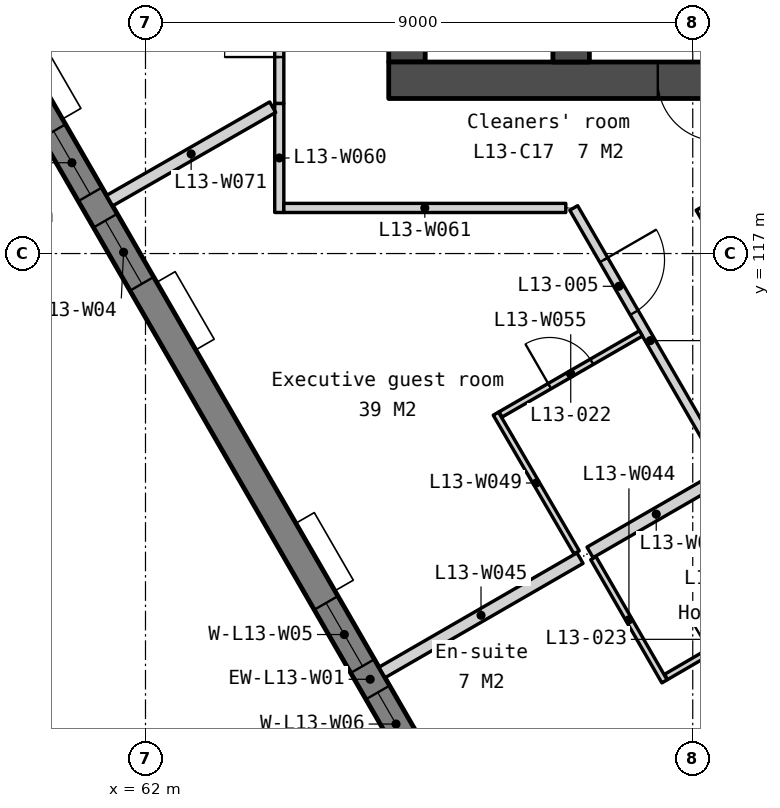
"""IFC4 building model, lengths in metres.
Left out: names, types, materials, properties, quantities, classifications, styles, units other than length and angle.
Written with IfcOpenShell. Run it as: python <this file> out.ifc"""

import sys

from ifc_helpers import new_model, si_unit, direction, frame, frame_2d, origin, place, context, subcontext, project, spatial, polyline, rectangle, outline, extrude, element, fill, save


model = new_model("IFC4")
c1 = context("Model", 3, precision=1e-05, world=origin(), true_north=direction((0.0, 1.0)))
c2 = subcontext(c1, "Body", "Model", "MODEL_VIEW")
j1 = project(units=[si_unit("LENGTHUNIT", "METRE"), si_unit("PLANEANGLEUNIT", "RADIAN")], contexts=[c1])
p1 = place(None, origin())
s1 = spatial("IfcSite", under=j1, at=p1, CompositionType="ELEMENT")
p2 = place(p1, origin())
s2 = spatial("IfcBuilding", under=s1, at=p2, CompositionType="ELEMENT")
p3 = place(p2, frame((0.0, 0.0, 59.5)))
s3 = spatial("IfcBuildingStorey", under=s2, at=p3, CompositionType="ELEMENT", Elevation=59.5)
p4 = place(p3, frame((66.3, 133.95, 0.0), z_axis=(0.0, 0.0, 1.0), x_axis=(0.0, -1.0, 0.0)))
e1 = element("IfcWall", 1, at=p4, inside=s3, PredefinedType="SOLIDWALL", context=c2, shape_type="SweptSolid", body=[
    extrude(rectangle(XDim=13.8, YDim=0.6, at=frame_2d((6.9, 0.0))), origin(), (0.0, 0.0, 1.0), 3.35),
])
p5 = place(p4, frame((0.6, 0.0, 0.0)))
e2 = element("IfcOpeningElement", 2, at=p5, cuts=e1, PredefinedType="OPENING", context=c2, shape_type="SweptSolid", body=[
    extrude(rectangle(XDim=1.1, YDim=2.1, at=frame_2d((0.55, 1.05))), frame((0.0, 0.31, 0.0), z_axis=(0.0, -1.0, 0.0), x_axis=(1.0, 0.0, 0.0)), (0.0, 0.0, 1.0), 0.62),
])
p6 = place(p4, frame((12.4, 0.0, 0.0)))
e3 = element("IfcOpeningElement", 3, at=p6, cuts=e1, PredefinedType="OPENING", context=c2, shape_type="SweptSolid", body=[
    extrude(rectangle(XDim=1.0, YDim=2.1, at=frame_2d((0.5, 1.05))), frame((0.0, 0.31, 0.0), z_axis=(0.0, -1.0, 0.0), x_axis=(1.0, 0.0, 0.0)), (0.0, 0.0, 1.0), 0.62),
])
p7 = place(p4, frame((8.5, 0.0, 0.0)))
e4 = element("IfcOpeningElement", 4, at=p7, cuts=e1, PredefinedType="OPENING", context=c2, shape_type="SweptSolid", body=[
    extrude(rectangle(XDim=1.0, YDim=2.1, at=frame_2d((0.5, 1.05))), frame((0.0, 0.31, 0.0), z_axis=(0.0, -1.0, 0.0), x_axis=(1.0, 0.0, 0.0)), (0.0, 0.0, 1.0), 0.62),
])
p8 = place(p4, frame((10.45, 0.0, 0.0)))
e5 = element("IfcOpeningElement", 5, at=p8, cuts=e1, PredefinedType="OPENING", context=c2, shape_type="SweptSolid", body=[
    extrude(rectangle(XDim=1.0, YDim=2.1, at=frame_2d((0.5, 1.05))), frame((0.0, 0.31, 0.0), z_axis=(0.0, -1.0, 0.0), x_axis=(1.0, 0.0, 0.0)), (0.0, 0.0, 1.0), 0.62),
])
p9 = place(p3, frame((66.0, 119.85, 0.0), z_axis=(0.0, 0.0, 1.0), x_axis=(1.0, 0.0, 0.0)))
e6 = element("IfcWall", 6, at=p9, inside=s3, PredefinedType="SOLIDWALL", context=c2, shape_type="SweptSolid", body=[
    extrude(rectangle(XDim=28.0, YDim=0.6, at=frame_2d((14.0, 0.0))), origin(), (0.0, 0.0, 1.0), 3.35),
])
p10 = place(p9, frame((6.825, 0.0, 0.0)))
e7 = element("IfcOpeningElement", 7, at=p10, cuts=e6, PredefinedType="OPENING", context=c2, shape_type="SweptSolid", body=[
    extrude(rectangle(XDim=1.8, YDim=2.1, at=frame_2d((0.9, 1.05))), frame((0.0, 0.31, 0.0), z_axis=(0.0, -1.0, 0.0), x_axis=(1.0, 0.0, 0.0)), (0.0, 0.0, 1.0), 0.62),
])
p11 = place(p9, frame((15.85, 0.0, 0.0)))
e8 = element("IfcOpeningElement", 8, at=p11, cuts=e6, PredefinedType="OPENING", context=c2, shape_type="SweptSolid", body=[
    extrude(rectangle(XDim=1.5, YDim=2.1, at=frame_2d((0.75, 1.05))), frame((0.0, 0.31, 0.0), z_axis=(0.0, -1.0, 0.0), x_axis=(1.0, 0.0, 0.0)), (0.0, 0.0, 1.0), 0.62),
])
p12 = place(p9, frame((19.375, 0.0, 0.0)))
e9 = element("IfcOpeningElement", 9, at=p12, cuts=e6, PredefinedType="OPENING", context=c2, shape_type="SweptSolid", body=[
    extrude(rectangle(XDim=1.8, YDim=2.1, at=frame_2d((0.9, 1.05))), frame((0.0, 0.31, 0.0), z_axis=(0.0, -1.0, 0.0), x_axis=(1.0, 0.0, 0.0)), (0.0, 0.0, 1.0), 0.62),
])
p13 = place(p9, frame((4.425, 0.0, 0.0)))
e10 = element("IfcOpeningElement", 10, at=p13, cuts=e6, PredefinedType="OPENING", context=c2, shape_type="SweptSolid", body=[
    extrude(rectangle(XDim=1.0, YDim=2.1, at=frame_2d((0.5, 1.05))), frame((0.0, 0.31, 0.0), z_axis=(0.0, -1.0, 0.0), x_axis=(1.0, 0.0, 0.0)), (0.0, 0.0, 1.0), 0.62),
])
p14 = place(p9, frame((9.925, 0.0, 0.0)))
e11 = element("IfcOpeningElement", 11, at=p14, cuts=e6, PredefinedType="OPENING", context=c2, shape_type="SweptSolid", body=[
    extrude(rectangle(XDim=1.0, YDim=2.1, at=frame_2d((0.5, 1.05))), frame((0.0, 0.31, 0.0), z_axis=(0.0, -1.0, 0.0), x_axis=(1.0, 0.0, 0.0)), (0.0, 0.0, 1.0), 0.62),
])
p15 = place(p9, frame((13.125, 0.0, 0.0)))
e12 = element("IfcOpeningElement", 12, at=p15, cuts=e6, PredefinedType="OPENING", context=c2, shape_type="SweptSolid", body=[
    extrude(rectangle(XDim=1.0, YDim=2.1, at=frame_2d((0.5, 1.05))), frame((0.0, 0.31, 0.0), z_axis=(0.0, -1.0, 0.0), x_axis=(1.0, 0.0, 0.0)), (0.0, 0.0, 1.0), 0.62),
])
p16 = place(p9, frame((21.725, 0.0, 0.0)))
e13 = element("IfcOpeningElement", 13, at=p16, cuts=e6, PredefinedType="OPENING", context=c2, shape_type="SweptSolid", body=[
    extrude(rectangle(XDim=1.0, YDim=2.1, at=frame_2d((0.5, 1.05))), frame((0.0, 0.31, 0.0), z_axis=(0.0, -1.0, 0.0), x_axis=(1.0, 0.0, 0.0)), (0.0, 0.0, 1.0), 0.62),
])
p17 = place(p9, frame((23.425, 0.0, 0.0)))
e14 = element("IfcOpeningElement", 14, at=p17, cuts=e6, PredefinedType="OPENING", context=c2, shape_type="SweptSolid", body=[
    extrude(rectangle(XDim=1.0, YDim=2.1, at=frame_2d((0.5, 1.05))), frame((0.0, 0.31, 0.0), z_axis=(0.0, -1.0, 0.0), x_axis=(1.0, 0.0, 0.0)), (0.0, 0.0, 1.0), 0.62),
])
p18 = place(p3, frame((69.0, 122.25, 0.0), z_axis=(0.0, 0.0, 1.0), x_axis=(0.0, -1.0, 0.0)))
e15 = element("IfcWall", 15, at=p18, inside=s3, PredefinedType="SOLIDWALL", context=c2, shape_type="SweptSolid", body=[
    extrude(rectangle(XDim=2.1, YDim=0.6, at=frame_2d((1.05, 0.0))), origin(), (0.0, 0.0, 1.0), 3.35),
])
p19 = place(p3, frame((54.495, 129.397, -0.15), z_axis=(0.0, 0.0, 1.0), x_axis=(0.499999201451, -0.866025864826, 0.0)))
e16 = element("IfcWall", 16, at=p19, inside=s3, PredefinedType="SOLIDWALL", context=c2, shape_type="SweptSolid", body=[
    extrude(outline(polyline([(44.8, 0.0), (44.8, 3.5), (0.0, 3.5), (0.0, 0.0), (44.8, 0.0)])), frame((0.0, 0.225, 0.0), z_axis=(0.0, -1.0, 0.0), x_axis=(1.0, 0.0, 0.0)), (0.0, 0.0, 1.0), 0.45),
])
p20 = place(p19, frame((3.03, 0.0, 1.05)))
e17 = element("IfcOpeningElement", 17, at=p20, cuts=e16, PredefinedType="OPENING", context=c2, shape_type="SweptSolid", body=[
    extrude(rectangle(XDim=1.2, YDim=1.5, at=frame_2d((0.6, 0.75))), frame((0.0, 0.235, 0.0), z_axis=(0.0, -1.0, 0.0), x_axis=(1.0, 0.0, 0.0)), (0.0, 0.0, 1.0), 0.47),
])
p21 = place(p19, frame((4.73, 0.0, 1.05)))
e18 = element("IfcOpeningElement", 18, at=p21, cuts=e16, PredefinedType="OPENING", context=c2, shape_type="SweptSolid", body=[
    extrude(rectangle(XDim=1.2, YDim=1.5, at=frame_2d((0.6, 0.75))), frame((0.0, 0.235, 0.0), z_axis=(0.0, -1.0, 0.0), x_axis=(1.0, 0.0, 0.0)), (0.0, 0.0, 1.0), 0.47),
])
p22 = place(p19, frame((11.99, 0.0, 1.05)))
e19 = element("IfcOpeningElement", 19, at=p22, cuts=e16, PredefinedType="OPENING", context=c2, shape_type="SweptSolid", body=[
    extrude(rectangle(XDim=1.2, YDim=1.5, at=frame_2d((0.6, 0.75))), frame((0.0, 0.235, 0.0), z_axis=(0.0, -1.0, 0.0), x_axis=(1.0, 0.0, 0.0)), (0.0, 0.0, 1.0), 0.47),
])
p23 = place(p19, frame((13.69, 0.0, 1.05)))
e20 = element("IfcOpeningElement", 20, at=p23, cuts=e16, PredefinedType="OPENING", context=c2, shape_type="SweptSolid", body=[
    extrude(rectangle(XDim=1.2, YDim=1.5, at=frame_2d((0.6, 0.75))), frame((0.0, 0.235, 0.0), z_axis=(0.0, -1.0, 0.0), x_axis=(1.0, 0.0, 0.0)), (0.0, 0.0, 1.0), 0.47),
])
p24 = place(p19, frame((20.95, 0.0, 1.05)))
e21 = element("IfcOpeningElement", 21, at=p24, cuts=e16, PredefinedType="OPENING", context=c2, shape_type="SweptSolid", body=[
    extrude(rectangle(XDim=1.2, YDim=1.5, at=frame_2d((0.6, 0.75))), frame((0.0, 0.235, 0.0), z_axis=(0.0, -1.0, 0.0), x_axis=(1.0, 0.0, 0.0)), (0.0, 0.0, 1.0), 0.47),
])
p25 = place(p19, frame((22.65, 0.0, 1.05)))
e22 = element("IfcOpeningElement", 22, at=p25, cuts=e16, PredefinedType="OPENING", context=c2, shape_type="SweptSolid", body=[
    extrude(rectangle(XDim=1.2, YDim=1.5, at=frame_2d((0.6, 0.75))), frame((0.0, 0.235, 0.0), z_axis=(0.0, -1.0, 0.0), x_axis=(1.0, 0.0, 0.0)), (0.0, 0.0, 1.0), 0.47),
])
p26 = place(p19, frame((29.91, 0.0, 1.05)))
e23 = element("IfcOpeningElement", 23, at=p26, cuts=e16, PredefinedType="OPENING", context=c2, shape_type="SweptSolid", body=[
    extrude(rectangle(XDim=1.2, YDim=1.5, at=frame_2d((0.6, 0.75))), frame((0.0, 0.235, 0.0), z_axis=(0.0, -1.0, 0.0), x_axis=(1.0, 0.0, 0.0)), (0.0, 0.0, 1.0), 0.47),
])
p27 = place(p19, frame((31.61, 0.0, 1.05)))
e24 = element("IfcOpeningElement", 24, at=p27, cuts=e16, PredefinedType="OPENING", context=c2, shape_type="SweptSolid", body=[
    extrude(rectangle(XDim=1.2, YDim=1.5, at=frame_2d((0.6, 0.75))), frame((0.0, 0.235, 0.0), z_axis=(0.0, -1.0, 0.0), x_axis=(1.0, 0.0, 0.0)), (0.0, 0.0, 1.0), 0.47),
])
p28 = place(p19, frame((38.87, 0.0, 1.05)))
e25 = element("IfcOpeningElement", 25, at=p28, cuts=e16, PredefinedType="OPENING", context=c2, shape_type="SweptSolid", body=[
    extrude(rectangle(XDim=1.2, YDim=1.5, at=frame_2d((0.6, 0.75))), frame((0.0, 0.235, 0.0), z_axis=(0.0, -1.0, 0.0), x_axis=(1.0, 0.0, 0.0)), (0.0, 0.0, 1.0), 0.47),
])
p29 = place(p19, frame((40.57, 0.0, 1.05)))
e26 = element("IfcOpeningElement", 26, at=p29, cuts=e16, PredefinedType="OPENING", context=c2, shape_type="SweptSolid", body=[
    extrude(rectangle(XDim=1.2, YDim=1.5, at=frame_2d((0.6, 0.75))), frame((0.0, 0.235, 0.0), z_axis=(0.0, -1.0, 0.0), x_axis=(1.0, 0.0, 0.0)), (0.0, 0.0, 1.0), 0.47),
])
p30 = place(p3, frame((68.13, 106.23, 0.0), z_axis=(0.0, 0.0, 1.0), x_axis=(0.86603151488, 0.499989415123, 0.0)))
e27 = element("IfcWall", 27, at=p30, inside=s3, PredefinedType="PARTITIONING", context=c2, shape_type="SweptSolid", body=[
    extrude(rectangle(XDim=6.465, YDim=0.2, at=frame_2d((3.232, 0.0))), origin(), (0.0, 0.0, 1.0), 3.35),
])
p31 = place(p3, frame((69.365, 111.99, 0.0), z_axis=(0.0, 0.0, 1.0), x_axis=(0.499999433879, -0.866025730634, 0.0)))
e28 = element("IfcWall", 28, at=p31, inside=s3, PredefinedType="PARTITIONING", context=c2, shape_type="SweptSolid", body=[
    extrude(rectangle(XDim=2.34, YDim=0.1, at=frame_2d((1.17, 0.0))), origin(), (0.0, 0.0, 1.0), 3.35),
])
p32 = place(p3, frame((65.89, 110.11, 0.0), z_axis=(0.0, 0.0, 1.0), x_axis=(0.866045024864, 0.499966013754, 0.0)))
e29 = element("IfcWall", 29, at=p32, inside=s3, PredefinedType="PARTITIONING", context=c2, shape_type="SweptSolid", body=[
    extrude(rectangle(XDim=3.76, YDim=0.2, at=frame_2d((1.88, 0.0))), origin(), (0.0, 0.0, 1.0), 3.35),
])
p33 = place(p3, frame((70.562, 110.037, 0.0), z_axis=(0.0, 0.0, 1.0), x_axis=(0.864132137734, 0.503264988386, 0.0)))
e30 = element("IfcWall", 30, at=p33, inside=s3, PredefinedType="PARTITIONING", context=c2, shape_type="SweptSolid", body=[
    extrude(rectangle(XDim=2.455, YDim=0.1, at=frame_2d((1.228, 0.0))), origin(), (0.0, 0.0, 1.0), 3.35),
])
p34 = place(p33, frame((0.827, 0.0, 0.0)))
e31 = element("IfcOpeningElement", 31, at=p34, cuts=e30, PredefinedType="OPENING", context=c2, shape_type="SweptSolid", body=[
    extrude(rectangle(XDim=0.8, YDim=2.1, at=frame_2d((0.4, 1.05))), frame((0.0, 0.06, 0.0), z_axis=(0.0, -1.0, 0.0), x_axis=(1.0, 0.0, 0.0)), (0.0, 0.0, 1.0), 0.12),
])
p35 = place(p3, frame((67.762, 114.367, 0.0), z_axis=(0.0, 0.0, 1.0), x_axis=(0.503163628445, -0.86419116115, 0.0)))
e32 = element("IfcWall", 32, at=p35, inside=s3, PredefinedType="PARTITIONING", context=c2, shape_type="SweptSolid", body=[
    extrude(rectangle(XDim=2.64, YDim=0.1, at=frame_2d((1.32, 0.0))), origin(), (0.0, 0.0, 1.0), 3.35),
])
p36 = place(p3, frame((69.311, 112.085, 0.0), z_axis=(0.0, 0.0, 1.0), x_axis=(0.866006140796, 0.500033362991, 0.0)))
e33 = element("IfcWall", 33, at=p36, inside=s3, PredefinedType="PARTITIONING", context=c2, shape_type="SweptSolid", body=[
    extrude(rectangle(XDim=2.515, YDim=0.2, at=frame_2d((1.257, 0.0))), origin(), (0.0, 0.0, 1.0), 3.35),
])
p37 = place(p3, frame((69.042, 117.75, 0.0), z_axis=(0.0, 0.0, 1.0), x_axis=(0.500004791531, -0.866022637375, 0.0)))
e34 = element("IfcWall", 34, at=p37, inside=s3, PredefinedType="PARTITIONING", context=c2, shape_type="SweptSolid", body=[
    extrude(rectangle(XDim=5.04, YDim=0.15, at=frame_2d((2.52, 0.0))), origin(), (0.0, 0.0, 1.0), 3.35),
])
p38 = place(p37, frame((0.988, 0.0, 0.0)))
e35 = element("IfcOpeningElement", 35, at=p38, cuts=e34, PredefinedType="OPENING", context=c2, shape_type="SweptSolid", body=[
    extrude(rectangle(XDim=1.0, YDim=2.1, at=frame_2d((0.5, 1.05))), frame((0.0, 0.085, 0.0), z_axis=(0.0, -1.0, 0.0), x_axis=(1.0, 0.0, 0.0)), (0.0, 0.0, 1.0), 0.17),
])
p39 = place(p3, frame((67.839, 114.354, 0.0), z_axis=(0.0, 0.0, 1.0), x_axis=(0.86601318911, 0.500021155841, 0.0)))
e36 = element("IfcWall", 36, at=p39, inside=s3, PredefinedType="PARTITIONING", context=c2, shape_type="SweptSolid", body=[
    extrude(rectangle(XDim=2.665, YDim=0.1, at=frame_2d((1.333, 0.0))), origin(), (0.0, 0.0, 1.0), 3.35),
])
p40 = place(p39, frame((0.933, 0.0, 0.0)))
e37 = element("IfcOpeningElement", 37, at=p40, cuts=e36, PredefinedType="OPENING", context=c2, shape_type="SweptSolid", body=[
    extrude(rectangle(XDim=0.8, YDim=2.1, at=frame_2d((0.4, 1.05))), frame((0.0, 0.06, 0.0), z_axis=(0.0, -1.0, 0.0), x_axis=(1.0, 0.0, 0.0)), (0.0, 0.0, 1.0), 0.12),
])
p41 = place(p3, frame((64.2, 117.675, 0.0), z_axis=(0.0, 0.0, 1.0), x_axis=(0.0, 1.0, 0.0)))
e38 = element("IfcWall", 38, at=p41, inside=s3, PredefinedType="PARTITIONING", context=c2, shape_type="SweptSolid", body=[
    extrude(rectangle(XDim=1.794, YDim=0.15, at=frame_2d((0.897, 0.0))), origin(), (0.0, 0.0, 1.0), 3.35),
])
p42 = place(p3, frame((64.275, 117.75, 0.0), z_axis=(0.0, 0.0, 1.0), x_axis=(1.0, 0.0, 0.0)))
e39 = element("IfcWall", 39, at=p42, inside=s3, PredefinedType="PARTITIONING", context=c2, shape_type="SweptSolid", body=[
    extrude(rectangle(XDim=4.637, YDim=0.15, at=frame_2d((2.319, 0.0))), origin(), (0.0, 0.0, 1.0), 3.35),
])
p43 = place(p3, frame((71.121, 117.75, 0.0), z_axis=(0.0, 0.0, 1.0), x_axis=(0.499995104884, -0.866028229963, 0.0)))
e40 = element("IfcWall", 40, at=p43, inside=s3, PredefinedType="PARTITIONING", context=c2, shape_type="SweptSolid", body=[
    extrude(rectangle(XDim=12.557, YDim=0.15, at=frame_2d((6.278, 0.0))), origin(), (0.0, 0.0, 1.0), 3.35),
])
p44 = place(p43, frame((5.828, 0.0, 0.0)))
e41 = element("IfcOpeningElement", 41, at=p44, cuts=e40, PredefinedType="OPENING", context=c2, shape_type="SweptSolid", body=[
    extrude(rectangle(XDim=0.9, YDim=2.1, at=frame_2d((0.45, 1.05))), frame((0.0, 0.085, 0.0), z_axis=(0.0, -1.0, 0.0), x_axis=(1.0, 0.0, 0.0)), (0.0, 0.0, 1.0), 0.17),
])
p45 = place(p3, frame((61.41, 117.87, 0.0), z_axis=(0.0, 0.0, 1.0), x_axis=(0.867566776681, 0.4973207094, 0.0)))
e42 = element("IfcWall", 42, at=p45, inside=s3, PredefinedType="PARTITIONING", context=c2, shape_type="SweptSolid", body=[
    extrude(rectangle(XDim=3.091, YDim=0.2, at=frame_2d((1.546, 0.0))), origin(), (0.0, 0.0, 1.0), 3.35),
])
p46 = place(p3, frame((64.2, 119.469, 0.0), z_axis=(0.0, 0.0, 1.0), x_axis=(0.0, 1.0, 0.0)))
e43 = element("IfcWall", 43, at=p46, inside=s3, PredefinedType="PARTITIONING", context=c2, shape_type="SweptSolid", body=[
    extrude(rectangle(XDim=2.425, YDim=0.15, at=frame_2d((1.212, 0.0))), origin(), (0.0, 0.0, 1.0), 3.35),
])
p47 = place(p46, frame((0.762, 0.0, 0.0)))
e44 = element("IfcOpeningElement", 44, at=p47, cuts=e43, PredefinedType="OPENING", context=c2, shape_type="SweptSolid", body=[
    extrude(rectangle(XDim=0.9, YDim=2.1, at=frame_2d((0.45, 1.05))), frame((0.0, 0.085, 0.0), z_axis=(0.0, -1.0, 0.0), x_axis=(1.0, 0.0, 0.0)), (0.0, 0.0, 1.0), 0.17),
])
p48 = place(p13, origin())
e45 = element("IfcDoor", 45, at=p48, inside=s3, OperationType="SINGLE_SWING_RIGHT", PredefinedType="DOOR", context=c2, shape_type="SweptSolid", body=[
    extrude(rectangle(XDim=1.0, YDim=2.1, at=frame_2d((0.5, 1.05))), frame((0.0, 0.025, 0.0), z_axis=(0.0, -1.0, 0.0), x_axis=(1.0, 0.0, 0.0)), (0.0, 0.0, 1.0), 0.05),
])
fill(e10, e45)
p49 = place(p22, origin())
e46 = element("IfcWindow", 46, at=p49, inside=s3, PartitioningType="SINGLE_PANEL", PredefinedType="WINDOW", context=c2, shape_type="SweptSolid", body=[
    extrude(rectangle(XDim=1.2, YDim=1.5, at=frame_2d((0.6, 0.75))), frame((0.0, 0.03, 0.0), z_axis=(0.0, -1.0, 0.0), x_axis=(1.0, 0.0, 0.0)), (0.0, 0.0, 1.0), 0.06),
])
fill(e19, e46)
p50 = place(p23, origin())
e47 = element("IfcWindow", 47, at=p50, inside=s3, PartitioningType="SINGLE_PANEL", PredefinedType="WINDOW", context=c2, shape_type="SweptSolid", body=[
    extrude(rectangle(XDim=1.2, YDim=1.5, at=frame_2d((0.6, 0.75))), frame((0.0, 0.03, 0.0), z_axis=(0.0, -1.0, 0.0), x_axis=(1.0, 0.0, 0.0)), (0.0, 0.0, 1.0), 0.06),
])
fill(e20, e47)
p51 = place(p24, origin())
e48 = element("IfcWindow", 48, at=p51, inside=s3, PartitioningType="SINGLE_PANEL", PredefinedType="WINDOW", context=c2, shape_type="SweptSolid", body=[
    extrude(rectangle(XDim=1.2, YDim=1.5, at=frame_2d((0.6, 0.75))), frame((0.0, 0.03, 0.0), z_axis=(0.0, -1.0, 0.0), x_axis=(1.0, 0.0, 0.0)), (0.0, 0.0, 1.0), 0.06),
])
fill(e21, e48)
p52 = place(p25, origin())
e49 = element("IfcWindow", 49, at=p52, inside=s3, PartitioningType="SINGLE_PANEL", PredefinedType="WINDOW", context=c2, shape_type="SweptSolid", body=[
    extrude(rectangle(XDim=1.2, YDim=1.5, at=frame_2d((0.6, 0.75))), frame((0.0, 0.03, 0.0), z_axis=(0.0, -1.0, 0.0), x_axis=(1.0, 0.0, 0.0)), (0.0, 0.0, 1.0), 0.06),
])
fill(e22, e49)
p53 = place(p47, origin())
e50 = element("IfcDoor", 50, at=p53, inside=s3, OperationType="SINGLE_SWING_LEFT", PredefinedType="DOOR", context=c2, shape_type="SweptSolid", body=[
    extrude(rectangle(XDim=0.9, YDim=2.1, at=frame_2d((0.45, 1.05))), frame((0.0, 0.025, 0.0), z_axis=(0.0, -1.0, 0.0), x_axis=(1.0, 0.0, 0.0)), (0.0, 0.0, 1.0), 0.05),
])
fill(e44, e50)
p54 = place(p38, origin())
e51 = element("IfcDoor", 51, at=p54, inside=s3, OperationType="SINGLE_SWING_LEFT", PredefinedType="DOOR", context=c2, shape_type="SweptSolid", body=[
    extrude(rectangle(XDim=1.0, YDim=2.1, at=frame_2d((0.5, 1.05))), frame((0.0, 0.025, 0.0), z_axis=(0.0, -1.0, 0.0), x_axis=(1.0, 0.0, 0.0)), (0.0, 0.0, 1.0), 0.05),
])
fill(e35, e51)
p55 = place(p40, origin())
e52 = element("IfcDoor", 52, at=p55, inside=s3, OperationType="SINGLE_SWING_LEFT", PredefinedType="DOOR", context=c2, shape_type="SweptSolid", body=[
    extrude(rectangle(XDim=0.8, YDim=2.1, at=frame_2d((0.4, 1.05))), frame((0.0, 0.025, 0.0), z_axis=(0.0, -1.0, 0.0), x_axis=(1.0, 0.0, 0.0)), (0.0, 0.0, 1.0), 0.05),
])
fill(e37, e52)
save(model, sys.argv[1])
